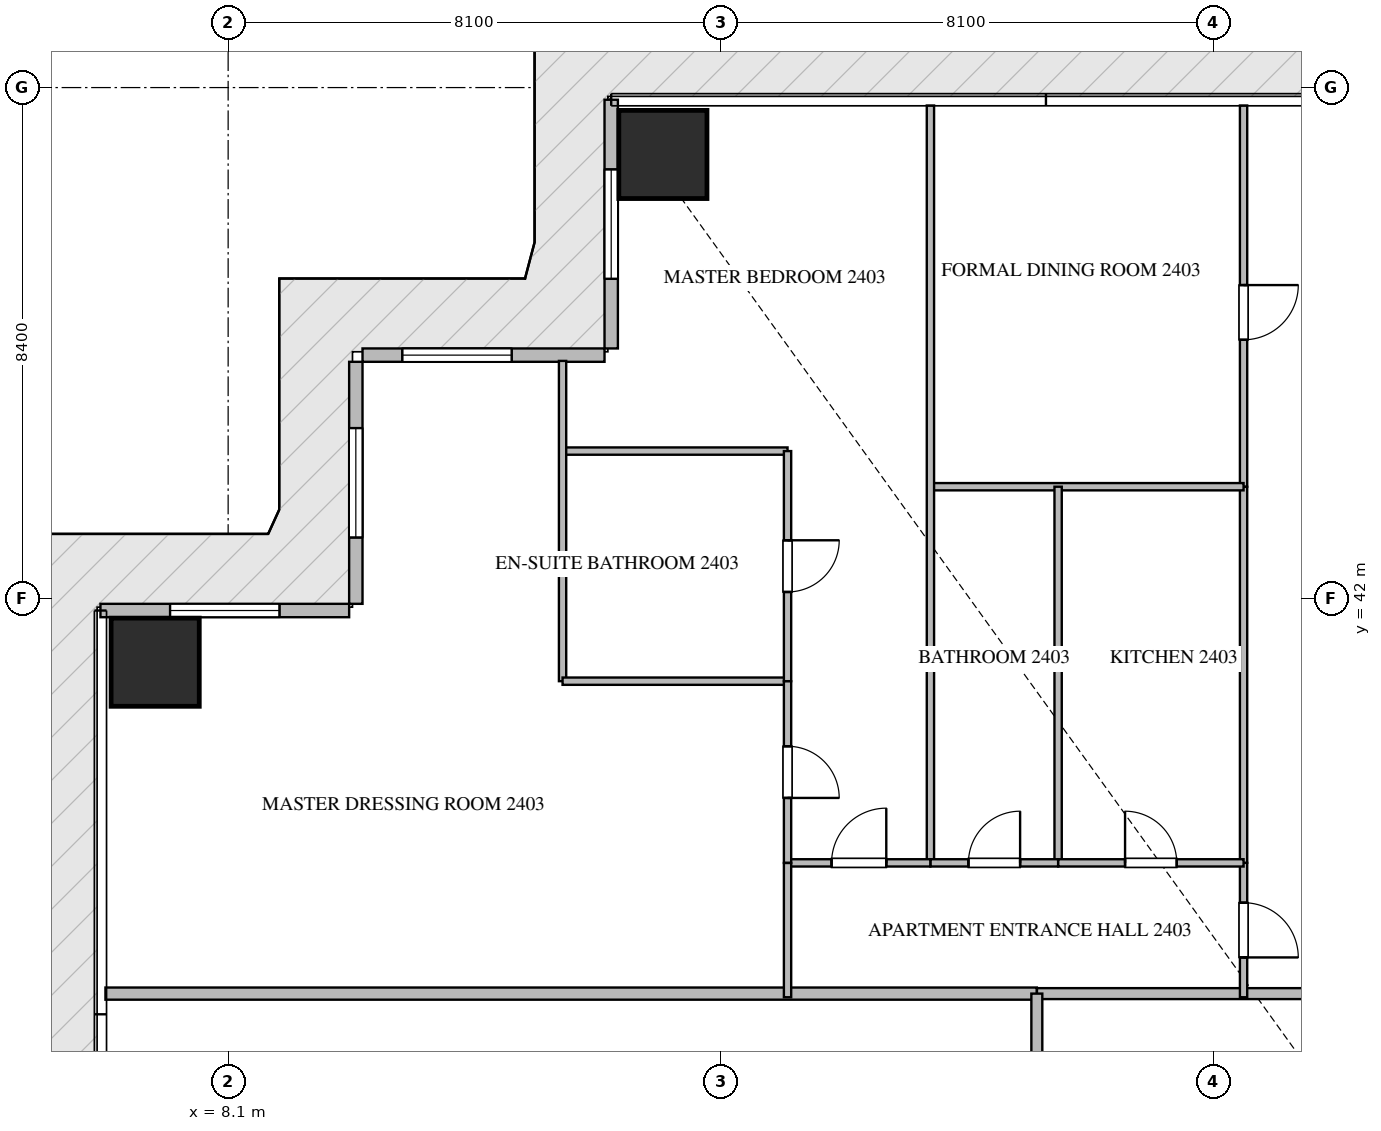
"""IFC4 building model, lengths in metres.
Left out: names, types, materials, properties, quantities, classifications, styles, units other than length and angle.
Written with IfcOpenShell. Run it as: python <this file> out.ifc"""

import sys

from ifc_helpers import new_model, si_unit, direction, frame, frame_2d, origin, origin_2d, place, context, subcontext, project, spatial, rectangle, extrude, source, transform, mapped, element, fill, save


model = new_model("IFC4")
c1 = context("Model", 3, precision=1e-05, world=origin(), true_north=direction((0.0, 1.0)))
c2 = subcontext(c1, "Body", "Model", "MODEL_VIEW")
j1 = project(units=[si_unit("LENGTHUNIT", "METRE"), si_unit("PLANEANGLEUNIT", "RADIAN")], contexts=[c1])
p1 = place(None, origin())
s1 = spatial("IfcSite", under=j1, at=p1, CompositionType="ELEMENT")
p2 = place(p1, origin())
s2 = spatial("IfcBuilding", under=s1, at=p2, CompositionType="ELEMENT")
p3 = place(p2, frame((0.0, 0.0, 97.95)))
s3 = spatial("IfcBuildingStorey", under=s2, at=p3, CompositionType="ELEMENT", Elevation=97.95)
m1 = source(origin(), c2, "Body", "SweptSolid", [
    extrude(rectangle(XDim=1.45, YDim=1.45, at=origin_2d()), origin(), (0.0, 0.0, 1.0), 3.75),
])
for number, where, z_axis, x_axis in (
    (1, (15.25, 49.3, -0.26), (0.0, 0.0, 1.0), (1.0, 0.0, 0.0)),
    (2, (6.9, 40.95, -0.26), (0.0, 0.0, 1.0), (1.0, 0.0, 0.0)),
):
    element("IfcColumn", number, at=place(p3, frame(where, z_axis=z_axis, x_axis=x_axis)), inside=s3, PredefinedType="COLUMN", context=c2, shape_type="MappedRepresentation", body=[
        mapped(m1, transform((0.0, 0.0, 0.0), scale=1.0)),
    ])
p4 = place(p3, frame((14.4, 50.2, 0.0), z_axis=(0.0, 0.0, 1.0), x_axis=(0.0, -1.0, 0.0)))
e3 = element("IfcWall", 3, at=p4, inside=s3, PredefinedType="ELEMENTEDWALL", context=c2, shape_type="SweptSolid", body=[
    extrude(rectangle(XDim=4.09, YDim=0.22, at=frame_2d((2.045, 0.0))), origin(), (0.0, 0.0, 1.0), 3.475),
])
p5 = place(p4, frame((1.145, 0.0, 0.65)))
e4 = element("IfcOpeningElement", 4, at=p5, cuts=e3, PredefinedType="OPENING", context=c2, shape_type="SweptSolid", body=[
    extrude(rectangle(XDim=1.8, YDim=2.1, at=frame_2d((0.9, 1.05))), frame((0.0, 0.12, 0.0), z_axis=(0.0, -1.0, 0.0), x_axis=(1.0, 0.0, 0.0)), (0.0, 0.0, 1.0), 0.24),
])
p6 = place(p3, frame((14.29, 46.0, 0.0), z_axis=(0.0, 0.0, 1.0), x_axis=(-1.0, 0.0, 0.0)))
e5 = element("IfcWall", 5, at=p6, inside=s3, PredefinedType="ELEMENTEDWALL", context=c2, shape_type="SweptSolid", body=[
    extrude(rectangle(XDim=3.98, YDim=0.22, at=frame_2d((1.99, 0.0))), origin(), (0.0, 0.0, 1.0), 3.475),
])
p7 = place(p6, frame((1.526, 0.0, 0.65)))
e6 = element("IfcOpeningElement", 6, at=p7, cuts=e5, PredefinedType="OPENING", context=c2, shape_type="SweptSolid", body=[
    extrude(rectangle(XDim=1.8, YDim=2.1, at=frame_2d((0.9, 1.05))), frame((0.0, 0.12, 0.0), z_axis=(0.0, -1.0, 0.0), x_axis=(1.0, 0.0, 0.0)), (0.0, 0.0, 1.0), 0.24),
])
p8 = place(p3, frame((10.2, 45.89, 0.0), z_axis=(0.0, 0.0, 1.0), x_axis=(0.0, -1.0, 0.0)))
e7 = element("IfcWall", 7, at=p8, inside=s3, PredefinedType="ELEMENTEDWALL", context=c2, shape_type="SweptSolid", body=[
    extrude(rectangle(XDim=3.98, YDim=0.22, at=frame_2d((1.99, 0.0))), origin(), (0.0, 0.0, 1.0), 3.475),
])
p9 = place(p8, frame((1.09, 0.0, 0.65)))
e8 = element("IfcOpeningElement", 8, at=p9, cuts=e7, PredefinedType="OPENING", context=c2, shape_type="SweptSolid", body=[
    extrude(rectangle(XDim=1.8, YDim=2.1, at=frame_2d((0.9, 1.05))), frame((0.0, 0.12, 0.0), z_axis=(0.0, -1.0, 0.0), x_axis=(1.0, 0.0, 0.0)), (0.0, 0.0, 1.0), 0.24),
])
p10 = place(p3, frame((10.09, 41.8, 0.0), z_axis=(0.0, 0.0, 1.0), x_axis=(-1.0, 0.0, 0.0)))
e9 = element("IfcWall", 9, at=p10, inside=s3, PredefinedType="ELEMENTEDWALL", context=c2, shape_type="SweptSolid", body=[
    extrude(rectangle(XDim=4.09, YDim=0.22, at=frame_2d((2.045, 0.0))), origin(), (0.0, 0.0, 1.0), 3.475),
])
p11 = place(p10, frame((1.145, 0.0, 0.65)))
e10 = element("IfcOpeningElement", 10, at=p11, cuts=e9, PredefinedType="OPENING", context=c2, shape_type="SweptSolid", body=[
    extrude(rectangle(XDim=1.8, YDim=2.1, at=frame_2d((0.9, 1.05))), frame((0.0, 0.12, 0.0), z_axis=(0.0, -1.0, 0.0), x_axis=(1.0, 0.0, 0.0)), (0.0, 0.0, 1.0), 0.24),
])
p12 = place(p3, frame((6.082, 35.5, 0.0), z_axis=(0.0, 0.0, 1.0), x_axis=(1.0, 0.0, 0.0)))
e11 = element("IfcWall", 11, at=p12, inside=s3, PredefinedType="PARTITIONING", context=c2, shape_type="SweptSolid", body=[
    extrude(rectangle(XDim=15.318, YDim=0.2, at=frame_2d((7.659, 0.0))), origin(), (0.0, 0.0, 1.0), 3.49),
])
p13 = place(p3, frame((21.402, 35.5, 0.0), z_axis=(0.0, 0.0, 1.0), x_axis=(1.0, 0.0, 0.0)))
e12 = element("IfcWall", 12, at=p13, inside=s3, PredefinedType="PARTITIONING", context=c2, shape_type="SweptSolid", body=[
    extrude(rectangle(XDim=21.996, YDim=0.18, at=frame_2d((10.998, 0.0))), origin(), (0.0, 0.0, 1.0), 3.49),
])
p14 = place(p13, frame((7.202, 0.0, 0.0)))
e13 = element("IfcOpeningElement", 13, at=p14, cuts=e12, PredefinedType="OPENING", context=c2, shape_type="SweptSolid", body=[
    extrude(rectangle(XDim=1.0, YDim=2.15, at=frame_2d((0.5, 1.075))), frame((0.0, 0.1, 0.0), z_axis=(0.0, -1.0, 0.0), x_axis=(1.0, 0.0, 0.0)), (0.0, 0.0, 1.0), 0.2),
])
p15 = place(p3, frame((21.4, 14.9, 0.0), z_axis=(0.0, 0.0, 1.0), x_axis=(0.0, 1.0, 0.0)))
e14 = element("IfcWall", 14, at=p15, inside=s3, PredefinedType="PARTITIONING", context=c2, shape_type="SweptSolid", body=[
    extrude(rectangle(XDim=20.6, YDim=0.18, at=frame_2d((10.3, 0.0))), origin(), (0.0, 0.0, 1.0), 3.49),
])
p16 = place(p15, frame((17.64, 0.0, 0.0)))
e15 = element("IfcOpeningElement", 15, at=p16, cuts=e14, PredefinedType="OPENING", context=c2, shape_type="SweptSolid", body=[
    extrude(rectangle(XDim=1.0, YDim=2.15, at=frame_2d((0.5, 1.075))), frame((0.0, 0.1, 0.0), z_axis=(0.0, -1.0, 0.0), x_axis=(1.0, 0.0, 0.0)), (0.0, 0.0, 1.0), 0.2),
])
p17 = place(p3, frame((24.8, 37.65, 0.0), z_axis=(0.0, 0.0, 1.0), x_axis=(0.0, -1.0, 0.0)))
e16 = element("IfcWall", 16, at=p17, inside=s3, PredefinedType="PARTITIONING", context=c2, shape_type="SweptSolid", body=[
    extrude(rectangle(XDim=2.21, YDim=0.12, at=frame_2d((1.105, 0.0))), origin(), (0.0, 0.0, 1.0), 3.49),
])
p18 = place(p17, frame((0.655, 0.0, 0.0)))
e17 = element("IfcOpeningElement", 17, at=p18, cuts=e16, PredefinedType="OPENING", context=c2, shape_type="SweptSolid", body=[
    extrude(rectangle(XDim=0.9, YDim=2.1, at=frame_2d((0.45, 1.05))), frame((0.0, 0.07, 0.0), z_axis=(0.0, -1.0, 0.0), x_axis=(1.0, 0.0, 0.0)), (0.0, 0.0, 1.0), 0.14),
])
p19 = place(p3, frame((24.8, 50.105, 0.0), z_axis=(0.0, 0.0, 1.0), x_axis=(0.0, -1.0, 0.0)))
e18 = element("IfcWall", 18, at=p19, inside=s3, PredefinedType="PARTITIONING", context=c2, shape_type="SweptSolid", body=[
    extrude(rectangle(XDim=6.269, YDim=0.12, at=frame_2d((3.135, 0.0))), origin(), (0.0, 0.0, 1.0), 3.49),
])
p20 = place(p19, frame((2.953, 0.0, 0.0)))
e19 = element("IfcOpeningElement", 19, at=p20, cuts=e18, PredefinedType="OPENING", context=c2, shape_type="SweptSolid", body=[
    extrude(rectangle(XDim=0.9, YDim=2.1, at=frame_2d((0.45, 1.05))), frame((0.0, 0.07, 0.0), z_axis=(0.0, -1.0, 0.0), x_axis=(1.0, 0.0, 0.0)), (0.0, 0.0, 1.0), 0.14),
])
p21 = place(p3, frame((24.8, 43.834, 0.0), z_axis=(0.0, 0.0, 1.0), x_axis=(0.0, -1.0, 0.0)))
e20 = element("IfcWall", 20, at=p21, inside=s3, PredefinedType="PARTITIONING", context=c2, shape_type="SweptSolid", body=[
    extrude(rectangle(XDim=6.182, YDim=0.12, at=frame_2d((3.091, 0.0))), origin(), (0.0, 0.0, 1.0), 3.49),
])
p22 = place(p3, frame((19.65, 43.836, 0.0), z_axis=(0.0, 0.0, 1.0), x_axis=(1.0, 0.0, 0.0)))
e21 = element("IfcWall", 21, at=p22, inside=s3, PredefinedType="PARTITIONING", context=c2, shape_type="SweptSolid", body=[
    extrude(rectangle(XDim=5.15, YDim=0.12, at=frame_2d((2.575, 0.0))), origin(), (0.0, 0.0, 1.0), 3.49),
])
p23 = place(p3, frame((19.65, 50.105, 0.0), z_axis=(0.0, 0.0, 1.0), x_axis=(0.0, -1.0, 0.0)))
e22 = element("IfcWall", 22, at=p23, inside=s3, PredefinedType="PARTITIONING", context=c2, shape_type="SweptSolid", body=[
    extrude(rectangle(XDim=12.455, YDim=0.12, at=frame_2d((6.228, 0.0))), origin(), (0.0, 0.0, 1.0), 3.49),
])
p24 = place(p3, frame((21.75, 43.836, 0.0), z_axis=(0.0, 0.0, 1.0), x_axis=(0.0, -1.0, 0.0)))
e23 = element("IfcWall", 23, at=p24, inside=s3, PredefinedType="PARTITIONING", context=c2, shape_type="SweptSolid", body=[
    extrude(rectangle(XDim=6.186, YDim=0.12, at=frame_2d((3.093, 0.0))), origin(), (0.0, 0.0, 1.0), 3.49),
])
p25 = place(p3, frame((19.65, 37.65, 0.0), z_axis=(0.0, 0.0, 1.0), x_axis=(1.0, 0.0, 0.0)))
e24 = element("IfcWall", 24, at=p25, inside=s3, PredefinedType="PARTITIONING", context=c2, shape_type="SweptSolid", body=[
    extrude(rectangle(XDim=2.1, YDim=0.12, at=frame_2d((1.05, 0.0))), origin(), (0.0, 0.0, 1.0), 3.49),
])
p26 = place(p25, frame((0.625, 0.0, 0.0)))
e25 = element("IfcOpeningElement", 25, at=p26, cuts=e24, PredefinedType="OPENING", context=c2, shape_type="SweptSolid", body=[
    extrude(rectangle(XDim=0.85, YDim=2.1, at=frame_2d((0.425, 1.05))), frame((0.0, 0.07, 0.0), z_axis=(0.0, -1.0, 0.0), x_axis=(1.0, 0.0, 0.0)), (0.0, 0.0, 1.0), 0.14),
])
p27 = place(p3, frame((21.752, 37.65, 0.0), z_axis=(0.0, 0.0, 1.0), x_axis=(1.0, 0.0, 0.0)))
e26 = element("IfcWall", 26, at=p27, inside=s3, PredefinedType="PARTITIONING", context=c2, shape_type="SweptSolid", body=[
    extrude(rectangle(XDim=3.048, YDim=0.12, at=frame_2d((1.524, 0.0))), origin(), (0.0, 0.0, 1.0), 3.49),
])
p28 = place(p27, frame((1.099, 0.0, 0.0)))
e27 = element("IfcOpeningElement", 27, at=p28, cuts=e26, PredefinedType="OPENING", context=c2, shape_type="SweptSolid", body=[
    extrude(rectangle(XDim=0.85, YDim=2.1, at=frame_2d((0.425, 1.05))), frame((0.0, 0.07, 0.0), z_axis=(0.0, -1.0, 0.0), x_axis=(1.0, 0.0, 0.0)), (0.0, 0.0, 1.0), 0.14),
])
p29 = place(p3, frame((17.3, 37.65, 0.0), z_axis=(0.0, 0.0, 1.0), x_axis=(1.0, 0.0, 0.0)))
e28 = element("IfcWall", 28, at=p29, inside=s3, PredefinedType="PARTITIONING", context=c2, shape_type="SweptSolid", body=[
    extrude(rectangle(XDim=2.348, YDim=0.12, at=frame_2d((1.174, 0.0))), origin(), (0.0, 0.0, 1.0), 3.49),
])
p30 = place(p29, frame((0.724, 0.0, 0.0)))
e29 = element("IfcOpeningElement", 29, at=p30, cuts=e28, PredefinedType="OPENING", context=c2, shape_type="SweptSolid", body=[
    extrude(rectangle(XDim=0.9, YDim=2.1, at=frame_2d((0.45, 1.05))), frame((0.0, 0.07, 0.0), z_axis=(0.0, -1.0, 0.0), x_axis=(1.0, 0.0, 0.0)), (0.0, 0.0, 1.0), 0.14),
])
p31 = place(p3, frame((13.6, 44.422, 0.0), z_axis=(0.0, 0.0, 1.0), x_axis=(1.0, 0.0, 0.0)))
e30 = element("IfcWall", 30, at=p31, inside=s3, PredefinedType="PARTITIONING", context=c2, shape_type="SweptSolid", body=[
    extrude(rectangle(XDim=3.7, YDim=0.12, at=frame_2d((1.85, 0.0))), origin(), (0.0, 0.0, 1.0), 3.49),
])
p32 = place(p3, frame((13.6, 45.905, 0.0), z_axis=(0.0, 0.0, 1.0), x_axis=(0.0, -1.0, 0.0)))
e31 = element("IfcWall", 31, at=p32, inside=s3, PredefinedType="PARTITIONING", context=c2, shape_type="SweptSolid", body=[
    extrude(rectangle(XDim=5.267, YDim=0.12, at=frame_2d((2.634, 0.0))), origin(), (0.0, 0.0, 1.0), 3.49),
])
p33 = place(p3, frame((13.6, 40.638, 0.0), z_axis=(0.0, 0.0, 1.0), x_axis=(1.0, 0.0, 0.0)))
e32 = element("IfcWall", 32, at=p33, inside=s3, PredefinedType="PARTITIONING", context=c2, shape_type="SweptSolid", body=[
    extrude(rectangle(XDim=3.7, YDim=0.12, at=frame_2d((1.85, 0.0))), origin(), (0.0, 0.0, 1.0), 3.49),
])
p34 = place(p3, frame((17.3, 44.422, 0.0), z_axis=(0.0, 0.0, 1.0), x_axis=(0.0, -1.0, 0.0)))
e33 = element("IfcWall", 33, at=p34, inside=s3, PredefinedType="PARTITIONING", context=c2, shape_type="SweptSolid", body=[
    extrude(rectangle(XDim=3.784, YDim=0.12, at=frame_2d((1.892, 0.0))), origin(), (0.0, 0.0, 1.0), 3.49),
])
p35 = place(p34, frame((1.467, 0.0, 0.0)))
e34 = element("IfcOpeningElement", 34, at=p35, cuts=e33, PredefinedType="OPENING", context=c2, shape_type="SweptSolid", body=[
    extrude(rectangle(XDim=0.85, YDim=2.1, at=frame_2d((0.425, 1.05))), frame((0.0, 0.07, 0.0), z_axis=(0.0, -1.0, 0.0), x_axis=(1.0, 0.0, 0.0)), (0.0, 0.0, 1.0), 0.14),
])
p36 = place(p3, frame((17.3, 40.636, 0.0), z_axis=(0.0, 0.0, 1.0), x_axis=(0.0, -1.0, 0.0)))
e35 = element("IfcWall", 35, at=p36, inside=s3, PredefinedType="PARTITIONING", context=c2, shape_type="SweptSolid", body=[
    extrude(rectangle(XDim=2.986, YDim=0.12, at=frame_2d((1.493, 0.0))), origin(), (0.0, 0.0, 1.0), 3.49),
])
p37 = place(p36, frame((1.068, 0.0, 0.0)))
e36 = element("IfcOpeningElement", 36, at=p37, cuts=e35, PredefinedType="OPENING", context=c2, shape_type="SweptSolid", body=[
    extrude(rectangle(XDim=0.85, YDim=2.1, at=frame_2d((0.425, 1.05))), frame((0.0, 0.07, 0.0), z_axis=(0.0, -1.0, 0.0), x_axis=(1.0, 0.0, 0.0)), (0.0, 0.0, 1.0), 0.14),
])
p38 = place(p3, frame((17.3, 37.648, 0.0), z_axis=(0.0, 0.0, 1.0), x_axis=(0.0, -1.0, 0.0)))
e37 = element("IfcWall", 37, at=p38, inside=s3, PredefinedType="PARTITIONING", context=c2, shape_type="SweptSolid", body=[
    extrude(rectangle(XDim=2.208, YDim=0.12, at=frame_2d((1.104, 0.0))), origin(), (0.0, 0.0, 1.0), 3.49),
])
m2 = source(origin(), c2, "Body", "SweptSolid", [
    extrude(rectangle(XDim=1.8, YDim=2.1, at=frame_2d((0.9, 1.05))), frame((0.0, 0.03, 0.0), z_axis=(0.0, -1.0, 0.0), x_axis=(1.0, 0.0, 0.0)), (0.0, 0.0, 1.0), 0.06),
])
p39 = place(p5, origin())
e38 = element("IfcWindow", 38, at=p39, inside=s3, PartitioningType="SINGLE_PANEL", PredefinedType="WINDOW", context=c2, shape_type="MappedRepresentation", body=[
    mapped(m2, transform((0.0, 0.0, 0.0), scale=1.0)),
])
fill(e4, e38)
p40 = place(p7, origin())
e39 = element("IfcWindow", 39, at=p40, inside=s3, PartitioningType="SINGLE_PANEL", PredefinedType="WINDOW", context=c2, shape_type="MappedRepresentation", body=[
    mapped(m2, transform((0.0, 0.0, 0.0), scale=1.0)),
])
fill(e6, e39)
p41 = place(p9, origin())
e40 = element("IfcWindow", 40, at=p41, inside=s3, PartitioningType="SINGLE_PANEL", PredefinedType="WINDOW", context=c2, shape_type="MappedRepresentation", body=[
    mapped(m2, transform((0.0, 0.0, 0.0), scale=1.0)),
])
fill(e8, e40)
p42 = place(p11, origin())
e41 = element("IfcWindow", 41, at=p42, inside=s3, PartitioningType="SINGLE_PANEL", PredefinedType="WINDOW", context=c2, shape_type="MappedRepresentation", body=[
    mapped(m2, transform((0.0, 0.0, 0.0), scale=1.0)),
])
fill(e10, e41)
m3 = source(origin(), c2, "Body", "SweptSolid", [
    extrude(rectangle(XDim=0.9, YDim=2.1, at=frame_2d((0.45, 1.05))), frame((0.0, 0.025, 0.0), z_axis=(0.0, -1.0, 0.0), x_axis=(1.0, 0.0, 0.0)), (0.0, 0.0, 1.0), 0.05),
])
p43 = place(p18, origin())
e42 = element("IfcDoor", 42, at=p43, inside=s3, OperationType="SINGLE_SWING_RIGHT", PredefinedType="DOOR", context=c2, shape_type="MappedRepresentation", body=[
    mapped(m3, transform((0.0, 0.0, 0.0), scale=1.0)),
])
fill(e17, e42)
p44 = place(p20, origin())
e43 = element("IfcDoor", 43, at=p44, inside=s3, OperationType="SINGLE_SWING_LEFT", PredefinedType="DOOR", context=c2, shape_type="MappedRepresentation", body=[
    mapped(m3, transform((0.0, 0.0, 0.0), scale=1.0)),
])
fill(e19, e43)
m4 = source(origin(), c2, "Body", "SweptSolid", [
    extrude(rectangle(XDim=0.85, YDim=2.1, at=frame_2d((0.425, 1.05))), frame((0.0, 0.025, 0.0), z_axis=(0.0, -1.0, 0.0), x_axis=(1.0, 0.0, 0.0)), (0.0, 0.0, 1.0), 0.05),
])
p45 = place(p26, origin())
e44 = element("IfcDoor", 44, at=p45, inside=s3, OperationType="SINGLE_SWING_RIGHT", PredefinedType="DOOR", context=c2, shape_type="MappedRepresentation", body=[
    mapped(m4, transform((0.0, 0.0, 0.0), scale=1.0)),
])
fill(e25, e44)
p46 = place(p28, origin())
e45 = element("IfcDoor", 45, at=p46, inside=s3, OperationType="SINGLE_SWING_LEFT", PredefinedType="DOOR", context=c2, shape_type="MappedRepresentation", body=[
    mapped(m4, transform((0.0, 0.0, 0.0), scale=1.0)),
])
fill(e27, e45)
p47 = place(p30, origin())
e46 = element("IfcDoor", 46, at=p47, inside=s3, OperationType="SINGLE_SWING_RIGHT", PredefinedType="DOOR", context=c2, shape_type="MappedRepresentation", body=[
    mapped(m3, transform((0.0, 0.0, 0.0), scale=1.0)),
])
fill(e29, e46)
p48 = place(p35, origin())
e47 = element("IfcDoor", 47, at=p48, inside=s3, OperationType="SINGLE_SWING_LEFT", PredefinedType="DOOR", context=c2, shape_type="MappedRepresentation", body=[
    mapped(m4, transform((0.0, 0.0, 0.0), scale=1.0)),
])
fill(e34, e47)
p49 = place(p37, origin())
e48 = element("IfcDoor", 48, at=p49, inside=s3, OperationType="SINGLE_SWING_RIGHT", PredefinedType="DOOR", context=c2, shape_type="MappedRepresentation", body=[
    mapped(m4, transform((0.0, 0.0, 0.0), scale=1.0)),
])
fill(e36, e48)
save(model, sys.argv[1])
